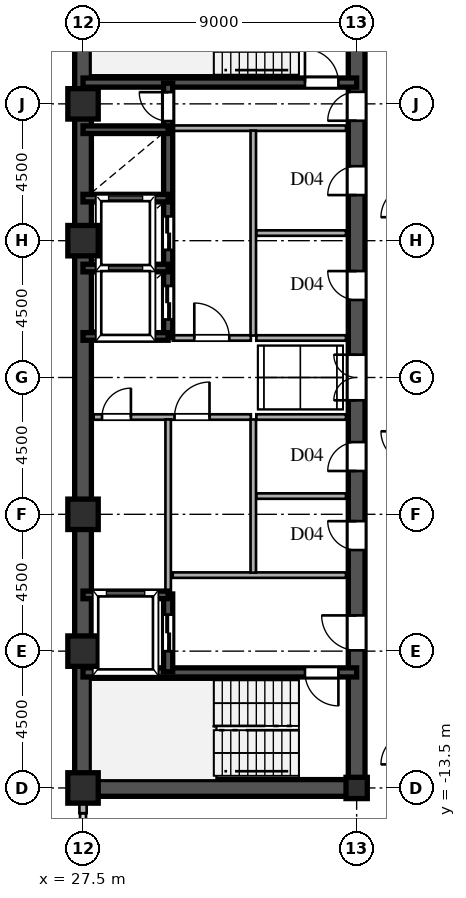
"""IFC4 building model, lengths in metres.
Left out: names, types, materials, properties, quantities, classifications, styles, units other than length and angle.
Written with IfcOpenShell. Run it as: python <this file> out.ifc"""

import sys

from ifc_helpers import new_model, si_unit, direction, frame, frame_2d, origin, origin_2d, place, context, subcontext, project, spatial, rectangle, hollow_rectangle, i_section, extrude, source, transform, mapped, element, fill, save


model = new_model("IFC4")
c1 = context("Model", 3, precision=1e-05, world=origin(), true_north=direction((0.0, 1.0)))
c2 = subcontext(c1, "Body", "Model", "MODEL_VIEW")
j1 = project(units=[si_unit("LENGTHUNIT", "METRE"), si_unit("PLANEANGLEUNIT", "RADIAN")], contexts=[c1])
p1 = place(None, origin())
s1 = spatial("IfcSite", under=j1, at=p1, CompositionType="ELEMENT")
p2 = place(p1, origin())
s2 = spatial("IfcBuilding", under=s1, at=p2, CompositionType="ELEMENT")
p3 = place(p2, frame((0.0, 0.0, 151.2)))
s3 = spatial("IfcBuildingStorey", under=s2, at=p3, CompositionType="ELEMENT", Elevation=151.2)
m1 = source(origin(), c2, "Body", "SweptSolid", [
    extrude(hollow_rectangle(XDim=1.0, YDim=1.0, WallThickness=0.042, at=origin_2d()), origin(), (0.0, 0.0, 1.0), 3.6),
])
for number, where, z_axis, x_axis in (
    (1, (27.5, -13.5, 0.0), (0.0, 0.0, 1.0), (1.0, 0.0, 0.0)),
    (2, (27.5, -9.0, 0.0), (0.0, 0.0, 1.0), (1.0, 0.0, 0.0)),
    (3, (27.5, -4.5, 0.0), (0.0, 0.0, 1.0), (1.0, 0.0, 0.0)),
    (4, (27.5, 4.5, 0.0), (0.0, 0.0, 1.0), (1.0, 0.0, 0.0)),
    (5, (27.5, 9.0, 0.0), (0.0, 0.0, 1.0), (1.0, 0.0, 0.0)),
):
    element("IfcColumn", number, at=place(p3, frame(where, z_axis=z_axis, x_axis=x_axis)), inside=s3, PredefinedType="COLUMN", context=c2, shape_type="MappedRepresentation", body=[
        mapped(m1, transform((0.0, 0.0, 0.0), scale=1.0)),
    ])
m2 = source(origin(), c2, "Body", "SweptSolid", [
    extrude(i_section(OverallWidth=0.7, OverallDepth=0.7, WebThickness=0.028, FlangeThickness=0.045, at=origin_2d()), origin(), (0.0, 0.0, 1.0), 3.6),
])
p4 = place(p3, frame((36.5, -13.5, 0.0), z_axis=(0.0, 0.0, 1.0), x_axis=(1.0, 0.0, 0.0)))
e6 = element("IfcColumn", 6, at=p4, inside=s3, PredefinedType="COLUMN", context=c2, shape_type="MappedRepresentation", body=[
    mapped(m2, transform((0.0, 0.0, 0.0), scale=1.0)),
])
p5 = place(p3, frame((27.5, -14.33, 0.0), z_axis=(0.0, 0.0, 1.0), x_axis=(0.0, 1.0, 0.0)))
e7 = element("IfcWall", 7, at=p5, inside=s3, PredefinedType="SOLIDWALL", context=c2, shape_type="SweptSolid", body=[
    extrude(rectangle(XDim=0.55, YDim=0.24, at=frame_2d((0.275, 0.0))), origin(), (0.0, 0.0, 1.0), 2.88),
])
for number, where, z_axis, x_axis in (
    (8, (27.5, -13.5, 0.0), (0.0, 0.0, 1.0), (0.0, 1.0, 0.0)),
    (9, (27.5, 1.3, 0.0), (0.0, 0.0, 1.0), (0.0, 1.0, 0.0)),
):
    element("IfcWall", number, at=place(p3, frame(where, z_axis=z_axis, x_axis=x_axis)), inside=s3, PredefinedType="SHEAR", context=c2, shape_type="SweptSolid", body=[
        extrude(rectangle(XDim=12.2, YDim=0.55, at=frame_2d((6.1, 0.0))), origin(), (0.0, 0.0, 1.0), 3.38),
    ])
p6 = place(p3, frame((27.5, -1.3, 0.0), z_axis=(0.0, 0.0, 1.0), x_axis=(0.0, 1.0, 0.0)))
e10 = element("IfcWall", 10, at=p6, inside=s3, PredefinedType="SHEAR", context=c2, shape_type="SweptSolid", body=[
    extrude(rectangle(XDim=2.6, YDim=0.55, at=frame_2d((1.3, 0.0))), origin(), (0.0, 0.0, 1.0), 3.38),
])
p7 = place(p3, frame((27.5, -13.5, 0.0), z_axis=(0.0, 0.0, 1.0), x_axis=(1.0, 0.0, 0.0)))
e11 = element("IfcWall", 11, at=p7, inside=s3, PredefinedType="SHEAR", context=c2, shape_type="SweptSolid", body=[
    extrude(rectangle(XDim=9.0, YDim=0.55, at=frame_2d((4.5, 0.0))), origin(), (0.0, 0.0, 1.0), 3.38),
])
p8 = place(p3, frame((36.5, -13.65, 0.0), z_axis=(0.0, 0.0, 1.0), x_axis=(0.0, 1.0, 0.0)))
e12 = element("IfcWall", 12, at=p8, inside=s3, PredefinedType="SHEAR", context=c2, shape_type="SweptSolid", body=[
    extrude(rectangle(XDim=7.15, YDim=0.55, at=frame_2d((3.575, 0.0))), origin(), (0.0, 0.0, 1.0), 3.38),
])
p9 = place(p8, frame((4.675, 0.0, 0.0)))
e13 = element("IfcOpeningElement", 13, at=p9, cuts=e12, PredefinedType="OPENING", context=c2, shape_type="SweptSolid", body=[
    extrude(rectangle(XDim=1.15, YDim=2.2, at=frame_2d((0.575, 1.1))), frame((0.0, 0.285, 0.0), z_axis=(0.0, -1.0, 0.0), x_axis=(1.0, 0.0, 0.0)), (0.0, 0.0, 1.0), 0.57),
])
p10 = place(p3, frame((36.5, -1.3, 0.0), z_axis=(0.0, 0.0, 1.0), x_axis=(0.0, 1.0, 0.0)))
e14 = element("IfcWall", 14, at=p10, inside=s3, PredefinedType="SHEAR", context=c2, shape_type="SweptSolid", body=[
    extrude(rectangle(XDim=2.6, YDim=0.55, at=frame_2d((1.3, 0.0))), origin(), (0.0, 0.0, 1.0), 3.38),
])
p11 = place(p10, frame((0.55, 0.0, 0.0)))
e15 = element("IfcOpeningElement", 15, at=p11, cuts=e14, PredefinedType="OPENING", context=c2, shape_type="SweptSolid", body=[
    extrude(rectangle(XDim=1.5, YDim=2.3, at=frame_2d((0.75, 1.15))), frame((0.0, 0.285, 0.0), z_axis=(0.0, -1.0, 0.0), x_axis=(1.0, 0.0, 0.0)), (0.0, 0.0, 1.0), 0.57),
])
p12 = place(p3, frame((36.5, 8.2, 0.0), z_axis=(0.0, 0.0, 1.0), x_axis=(0.0, 1.0, 0.0)))
e16 = element("IfcWall", 16, at=p12, inside=s3, PredefinedType="SHEAR", context=c2, shape_type="SweptSolid", body=[
    extrude(rectangle(XDim=5.45, YDim=0.55, at=frame_2d((2.725, 0.0))), origin(), (0.0, 0.0, 1.0), 3.38),
])
p13 = place(p12, frame((0.245, 0.0, 0.0)))
e17 = element("IfcOpeningElement", 17, at=p13, cuts=e16, PredefinedType="OPENING", context=c2, shape_type="SweptSolid", body=[
    extrude(rectangle(XDim=0.95, YDim=2.15, at=frame_2d((0.475, 1.075))), frame((0.0, 0.285, 0.0), z_axis=(0.0, -1.0, 0.0), x_axis=(1.0, 0.0, 0.0)), (0.0, 0.0, 1.0), 0.57),
])
p14 = place(p3, frame((36.5, -6.5, 0.0), z_axis=(0.0, 0.0, 1.0), x_axis=(0.0, 1.0, 0.0)))
e18 = element("IfcWall", 18, at=p14, inside=s3, PredefinedType="SHEAR", context=c2, shape_type="SweptSolid", body=[
    extrude(rectangle(XDim=2.6, YDim=0.55, at=frame_2d((1.3, 0.0))), origin(), (0.0, 0.0, 1.0), 3.38),
])
p15 = place(p14, frame((0.825, 0.0, 0.0)))
e19 = element("IfcOpeningElement", 19, at=p15, cuts=e18, PredefinedType="OPENING", context=c2, shape_type="SweptSolid", body=[
    extrude(rectangle(XDim=0.95, YDim=2.15, at=frame_2d((0.475, 1.075))), frame((0.0, 0.285, 0.0), z_axis=(0.0, -1.0, 0.0), x_axis=(1.0, 0.0, 0.0)), (0.0, 0.0, 1.0), 0.57),
])
p16 = place(p3, frame((36.5, -3.9, 0.0), z_axis=(0.0, 0.0, 1.0), x_axis=(0.0, 1.0, 0.0)))
e20 = element("IfcWall", 20, at=p16, inside=s3, PredefinedType="SHEAR", context=c2, shape_type="SweptSolid", body=[
    extrude(rectangle(XDim=2.6, YDim=0.55, at=frame_2d((1.3, 0.0))), origin(), (0.0, 0.0, 1.0), 3.38),
])
p17 = place(p16, frame((0.825, 0.0, 0.0)))
e21 = element("IfcOpeningElement", 21, at=p17, cuts=e20, PredefinedType="OPENING", context=c2, shape_type="SweptSolid", body=[
    extrude(rectangle(XDim=0.95, YDim=2.15, at=frame_2d((0.475, 1.075))), frame((0.0, 0.285, 0.0), z_axis=(0.0, -1.0, 0.0), x_axis=(1.0, 0.0, 0.0)), (0.0, 0.0, 1.0), 0.57),
])
p18 = place(p3, frame((36.5, 1.3, 0.0), z_axis=(0.0, 0.0, 1.0), x_axis=(0.0, 1.0, 0.0)))
e22 = element("IfcWall", 22, at=p18, inside=s3, PredefinedType="SHEAR", context=c2, shape_type="SweptSolid", body=[
    extrude(rectangle(XDim=3.45, YDim=0.55, at=frame_2d((1.725, 0.0))), origin(), (0.0, 0.0, 1.0), 3.38),
])
p19 = place(p18, frame((1.25, 0.0, 0.0)))
e23 = element("IfcOpeningElement", 23, at=p19, cuts=e22, PredefinedType="OPENING", context=c2, shape_type="SweptSolid", body=[
    extrude(rectangle(XDim=0.95, YDim=2.15, at=frame_2d((0.475, 1.075))), frame((0.0, 0.285, 0.0), z_axis=(0.0, -1.0, 0.0), x_axis=(1.0, 0.0, 0.0)), (0.0, 0.0, 1.0), 0.57),
])
p20 = place(p3, frame((36.5, 4.75, 0.0), z_axis=(0.0, 0.0, 1.0), x_axis=(0.0, 1.0, 0.0)))
e24 = element("IfcWall", 24, at=p20, inside=s3, PredefinedType="SHEAR", context=c2, shape_type="SweptSolid", body=[
    extrude(rectangle(XDim=3.45, YDim=0.55, at=frame_2d((1.725, 0.0))), origin(), (0.0, 0.0, 1.0), 3.38),
])
p21 = place(p20, frame((1.25, 0.0, 0.0)))
e25 = element("IfcOpeningElement", 25, at=p21, cuts=e24, PredefinedType="OPENING", context=c2, shape_type="SweptSolid", body=[
    extrude(rectangle(XDim=0.95, YDim=2.15, at=frame_2d((0.475, 1.075))), frame((0.0, 0.285, 0.0), z_axis=(0.0, -1.0, 0.0), x_axis=(1.0, 0.0, 0.0)), (0.0, 0.0, 1.0), 0.57),
])
p22 = place(p3, frame((27.5, -9.7, 0.0), z_axis=(0.0, 0.0, 1.0), x_axis=(1.0, 0.0, 0.0)))
e26 = element("IfcWall", 26, at=p22, inside=s3, PredefinedType="SHEAR", context=c2, shape_type="SweptSolid", body=[
    extrude(rectangle(XDim=9.0, YDim=0.3, at=frame_2d((4.5, 0.0))), origin(), (0.0, 0.0, 1.0), 3.38),
])
p23 = place(p22, frame((7.3, 0.0, 0.0)))
e27 = element("IfcOpeningElement", 27, at=p23, cuts=e26, PredefinedType="OPENING", context=c2, shape_type="SweptSolid", body=[
    extrude(rectangle(XDim=1.1, YDim=2.2, at=frame_2d((0.55, 1.1))), frame((0.0, 0.16, 0.0), z_axis=(0.0, -1.0, 0.0), x_axis=(1.0, 0.0, 0.0)), (0.0, 0.0, 1.0), 0.32),
])
p24 = place(p3, frame((27.5, 9.7, 0.0), z_axis=(0.0, 0.0, 1.0), x_axis=(1.0, 0.0, 0.0)))
e28 = element("IfcWall", 28, at=p24, inside=s3, PredefinedType="SHEAR", context=c2, shape_type="SweptSolid", body=[
    extrude(rectangle(XDim=9.0, YDim=0.3, at=frame_2d((4.5, 0.0))), origin(), (0.0, 0.0, 1.0), 3.38),
])
p25 = place(p24, frame((7.3, 0.0, 0.0)))
e29 = element("IfcOpeningElement", 29, at=p25, cuts=e28, PredefinedType="OPENING", context=c2, shape_type="SweptSolid", body=[
    extrude(rectangle(XDim=1.1, YDim=2.2, at=frame_2d((0.55, 1.1))), frame((0.0, 0.16, 0.0), z_axis=(0.0, -1.0, 0.0), x_axis=(1.0, 0.0, 0.0)), (0.0, 0.0, 1.0), 0.32),
])
for number, where, z_axis, x_axis in (
    (30, (27.5, -7.15, 0.0), (0.0, 0.0, 1.0), (1.0, 0.0, 0.0)),
    (31, (27.5, 1.35, 0.0), (0.0, 0.0, 1.0), (1.0, 0.0, 0.0)),
    (32, (27.5, 3.6, 0.0), (0.0, 0.0, 1.0), (1.0, 0.0, 0.0)),
    (33, (27.5, 5.9, 0.0), (0.0, 0.0, 1.0), (1.0, 0.0, 0.0)),
    (34, (27.5, 8.15, 0.0), (0.0, 0.0, 1.0), (1.0, 0.0, 0.0)),
):
    element("IfcWall", number, at=place(p3, frame(where, z_axis=z_axis, x_axis=x_axis)), inside=s3, PredefinedType="SHEAR", context=c2, shape_type="SweptSolid", body=[
        extrude(rectangle(XDim=2.8, YDim=0.25, at=frame_2d((1.4, 0.0))), origin(), (0.0, 0.0, 1.0), 3.38),
    ])
p26 = place(p3, frame((30.3, -9.68, 0.0), z_axis=(0.0, 0.0, 1.0), x_axis=(0.0, 1.0, 0.0)))
e35 = element("IfcWall", 35, at=p26, inside=s3, PredefinedType="SHEAR", context=c2, shape_type="SweptSolid", body=[
    extrude(rectangle(XDim=2.56, YDim=0.3, at=frame_2d((1.28, 0.0))), origin(), (0.0, 0.0, 1.0), 3.38),
])
p27 = place(p26, frame((0.68, 0.0, 0.0)))
e36 = element("IfcOpeningElement", 36, at=p27, cuts=e35, PredefinedType="OPENING", context=c2, shape_type="SweptSolid", body=[
    extrude(rectangle(XDim=1.2, YDim=2.25, at=frame_2d((0.6, 1.125))), frame((0.0, 0.16, 0.0), z_axis=(0.0, -1.0, 0.0), x_axis=(1.0, 0.0, 0.0)), (0.0, 0.0, 1.0), 0.32),
])
p28 = place(p3, frame((30.3, 1.32, 0.0), z_axis=(0.0, 0.0, 1.0), x_axis=(0.0, 1.0, 0.0)))
e37 = element("IfcWall", 37, at=p28, inside=s3, PredefinedType="SHEAR", context=c2, shape_type="SweptSolid", body=[
    extrude(rectangle(XDim=2.28, YDim=0.3, at=frame_2d((1.14, 0.0))), origin(), (0.0, 0.0, 1.0), 3.38),
])
p29 = place(p28, frame((0.59, 0.0, 0.0)))
e38 = element("IfcOpeningElement", 38, at=p29, cuts=e37, PredefinedType="OPENING", context=c2, shape_type="SweptSolid", body=[
    extrude(rectangle(XDim=1.1, YDim=2.2, at=frame_2d((0.55, 1.1))), frame((0.0, 0.16, 0.0), z_axis=(0.0, -1.0, 0.0), x_axis=(1.0, 0.0, 0.0)), (0.0, 0.0, 1.0), 0.32),
])
p30 = place(p3, frame((30.3, 3.6, 0.0), z_axis=(0.0, 0.0, 1.0), x_axis=(0.0, 1.0, 0.0)))
e39 = element("IfcWall", 39, at=p30, inside=s3, PredefinedType="SHEAR", context=c2, shape_type="SweptSolid", body=[
    extrude(rectangle(XDim=2.3, YDim=0.3, at=frame_2d((1.15, 0.0))), origin(), (0.0, 0.0, 1.0), 3.38),
])
p31 = place(p30, frame((0.6, 0.0, 0.0)))
e40 = element("IfcOpeningElement", 40, at=p31, cuts=e39, PredefinedType="OPENING", context=c2, shape_type="SweptSolid", body=[
    extrude(rectangle(XDim=1.1, YDim=2.2, at=frame_2d((0.55, 1.1))), frame((0.0, 0.16, 0.0), z_axis=(0.0, -1.0, 0.0), x_axis=(1.0, 0.0, 0.0)), (0.0, 0.0, 1.0), 0.32),
])
p32 = place(p3, frame((30.3, 5.9, 0.0), z_axis=(0.0, 0.0, 1.0), x_axis=(0.0, 1.0, 0.0)))
e41 = element("IfcWall", 41, at=p32, inside=s3, PredefinedType="SHEAR", context=c2, shape_type="SweptSolid", body=[
    extrude(rectangle(XDim=2.25, YDim=0.3, at=frame_2d((1.125, 0.0))), origin(), (0.0, 0.0, 1.0), 3.38),
])
p33 = place(p3, frame((30.3, 8.15, 0.0), z_axis=(0.0, 0.0, 1.0), x_axis=(0.0, 1.0, 0.0)))
e42 = element("IfcWall", 42, at=p33, inside=s3, PredefinedType="SHEAR", context=c2, shape_type="SweptSolid", body=[
    extrude(rectangle(XDim=1.53, YDim=0.3, at=frame_2d((0.765, 0.0))), origin(), (0.0, 0.0, 1.0), 3.38),
])
p34 = place(p33, frame((0.285, 0.0, 0.0)))
e43 = element("IfcOpeningElement", 43, at=p34, cuts=e42, PredefinedType="OPENING", context=c2, shape_type="SweptSolid", body=[
    extrude(rectangle(XDim=0.95, YDim=2.15, at=frame_2d((0.475, 1.075))), frame((0.0, 0.16, 0.0), z_axis=(0.0, -1.0, 0.0), x_axis=(1.0, 0.0, 0.0)), (0.0, 0.0, 1.0), 0.32),
])
for number, where, z_axis, x_axis in (
    (44, (30.45, -6.5, 0.0), (0.0, 0.0, 1.0), (1.0, 0.0, 0.0)),
    (45, (30.45, 8.2, 0.0), (0.0, 0.0, 1.0), (1.0, 0.0, 0.0)),
):
    element("IfcWall", number, at=place(p3, frame(where, z_axis=z_axis, x_axis=x_axis)), inside=s3, PredefinedType="PARTITIONING", context=c2, shape_type="SweptSolid", body=[
        extrude(rectangle(XDim=5.7, YDim=0.18, at=frame_2d((2.85, 0.0))), origin(), (0.0, 0.0, 1.0), 3.38),
    ])
p35 = place(p3, frame((33.1, -6.42, 0.0), z_axis=(0.0, 0.0, 1.0), x_axis=(0.0, 1.0, 0.0)))
e46 = element("IfcWall", 46, at=p35, inside=s3, PredefinedType="PARTITIONING", context=c2, shape_type="SweptSolid", body=[
    extrude(rectangle(XDim=5.04, YDim=0.18, at=frame_2d((2.52, 0.0))), origin(), (0.0, 0.0, 1.0), 3.38),
])
p36 = place(p3, frame((33.1, 1.38, 0.0), z_axis=(0.0, 0.0, 1.0), x_axis=(0.0, 1.0, 0.0)))
e47 = element("IfcWall", 47, at=p36, inside=s3, PredefinedType="PARTITIONING", context=c2, shape_type="SweptSolid", body=[
    extrude(rectangle(XDim=6.74, YDim=0.18, at=frame_2d((3.37, 0.0))), origin(), (0.0, 0.0, 1.0), 3.38),
])
p37 = place(p3, frame((27.85, -1.3, 0.0), z_axis=(0.0, 0.0, 1.0), x_axis=(1.0, 0.0, 0.0)))
e48 = element("IfcWall", 48, at=p37, inside=s3, PredefinedType="PARTITIONING", context=c2, shape_type="SweptSolid", body=[
    extrude(rectangle(XDim=2.45, YDim=0.18, at=frame_2d((1.225, 0.0))), origin(), (0.0, 0.0, 1.0), 3.38),
])
p38 = place(p37, frame((0.275, 0.0, 0.0)))
e49 = element("IfcOpeningElement", 49, at=p38, cuts=e48, PredefinedType="OPENING", context=c2, shape_type="SweptSolid", body=[
    extrude(rectangle(XDim=0.95, YDim=2.15, at=frame_2d((0.475, 1.075))), frame((0.0, 0.1, 0.0), z_axis=(0.0, -1.0, 0.0), x_axis=(1.0, 0.0, 0.0)), (0.0, 0.0, 1.0), 0.2),
])
p39 = place(p3, frame((30.3, -1.3, 0.0), z_axis=(0.0, 0.0, 1.0), x_axis=(1.0, 0.0, 0.0)))
e50 = element("IfcWall", 50, at=p39, inside=s3, PredefinedType="PARTITIONING", context=c2, shape_type="SweptSolid", body=[
    extrude(rectangle(XDim=2.72, YDim=0.18, at=frame_2d((1.36, 0.0))), origin(), (0.0, 0.0, 1.0), 3.38),
])
p40 = place(p39, frame((0.21, 0.0, 0.0)))
e51 = element("IfcOpeningElement", 51, at=p40, cuts=e50, PredefinedType="OPENING", context=c2, shape_type="SweptSolid", body=[
    extrude(rectangle(XDim=1.15, YDim=2.2, at=frame_2d((0.575, 1.1))), frame((0.0, 0.1, 0.0), z_axis=(0.0, -1.0, 0.0), x_axis=(1.0, 0.0, 0.0)), (0.0, 0.0, 1.0), 0.2),
])
p41 = place(p3, frame((30.3, -7.12, 0.0), z_axis=(0.0, 0.0, 1.0), x_axis=(0.0, 1.0, 0.0)))
e52 = element("IfcWall", 52, at=p41, inside=s3, PredefinedType="PARTITIONING", context=c2, shape_type="SweptSolid", body=[
    extrude(rectangle(XDim=5.74, YDim=0.18, at=frame_2d((2.87, 0.0))), origin(), (0.0, 0.0, 1.0), 3.38),
])
p42 = place(p3, frame((30.45, 1.3, 0.0), z_axis=(0.0, 0.0, 1.0), x_axis=(1.0, 0.0, 0.0)))
e53 = element("IfcWall", 53, at=p42, inside=s3, PredefinedType="PARTITIONING", context=c2, shape_type="SweptSolid", body=[
    extrude(rectangle(XDim=2.57, YDim=0.18, at=frame_2d((1.285, 0.0))), origin(), (0.0, 0.0, 1.0), 3.38),
])
p43 = place(p42, frame((0.71, 0.0, 0.0)))
e54 = element("IfcOpeningElement", 54, at=p43, cuts=e53, PredefinedType="OPENING", context=c2, shape_type="SweptSolid", body=[
    extrude(rectangle(XDim=1.15, YDim=2.2, at=frame_2d((0.575, 1.1))), frame((0.0, 0.1, 0.0), z_axis=(0.0, -1.0, 0.0), x_axis=(1.0, 0.0, 0.0)), (0.0, 0.0, 1.0), 0.2),
])
for number, where, z_axis, x_axis in (
    (55, (33.2, -1.3, 0.0), (0.0, 0.0, 1.0), (1.0, 0.0, 0.0)),
    (56, (33.2, 1.3, 0.0), (0.0, 0.0, 1.0), (1.0, 0.0, 0.0)),
    (57, (33.2, -3.9, 0.0), (0.0, 0.0, 1.0), (1.0, 0.0, 0.0)),
    (58, (33.2, 4.75, 0.0), (0.0, 0.0, 1.0), (1.0, 0.0, 0.0)),
):
    element("IfcWall", number, at=place(p3, frame(where, z_axis=z_axis, x_axis=x_axis)), inside=s3, PredefinedType="PARTITIONING", context=c2, shape_type="SweptSolid", body=[
        extrude(rectangle(XDim=2.95, YDim=0.18, at=frame_2d((1.475, 0.0))), origin(), (0.0, 0.0, 1.0), 3.38),
    ])
m3 = source(origin(), c2, "Body", "SweptSolid", [
    extrude(rectangle(XDim=1.15, YDim=2.2, at=frame_2d((0.575, 1.1))), frame((0.0, 0.025, 0.0), z_axis=(0.0, -1.0, 0.0), x_axis=(1.0, 0.0, 0.0)), (0.0, 0.0, 1.0), 0.05),
])
p44 = place(p9, origin())
e59 = element("IfcDoor", 59, at=p44, inside=s3, OperationType="SINGLE_SWING_RIGHT", PredefinedType="DOOR", context=c2, shape_type="MappedRepresentation", body=[
    mapped(m3, transform((0.0, 0.0, 0.0), scale=1.0)),
])
fill(e13, e59)
m4 = source(origin(), c2, "Body", "SweptSolid", [
    extrude(rectangle(XDim=1.5, YDim=2.3, at=frame_2d((0.75, 1.15))), frame((0.0, 0.025, 0.0), z_axis=(0.0, -1.0, 0.0), x_axis=(1.0, 0.0, 0.0)), (0.0, 0.0, 1.0), 0.05),
])
p45 = place(p11, origin())
e60 = element("IfcDoor", 60, at=p45, inside=s3, OperationType="DOUBLE_SWING_LEFT", PredefinedType="DOOR", context=c2, shape_type="MappedRepresentation", body=[
    mapped(m4, transform((0.0, 0.0, 0.0), scale=1.0)),
])
fill(e15, e60)
m5 = source(origin(), c2, "Body", "SweptSolid", [
    extrude(rectangle(XDim=0.95, YDim=2.15, at=frame_2d((0.475, 1.075))), frame((0.0, 0.025, 0.0), z_axis=(0.0, -1.0, 0.0), x_axis=(1.0, 0.0, 0.0)), (0.0, 0.0, 1.0), 0.05),
])
p46 = place(p13, origin())
e61 = element("IfcDoor", 61, at=p46, inside=s3, OperationType="SINGLE_SWING_LEFT", PredefinedType="DOOR", context=c2, shape_type="MappedRepresentation", body=[
    mapped(m5, transform((0.0, 0.0, 0.0), scale=1.0)),
])
fill(e17, e61)
p47 = place(p15, origin())
e62 = element("IfcDoor", 62, at=p47, inside=s3, OperationType="SINGLE_SWING_RIGHT", PredefinedType="DOOR", context=c2, shape_type="MappedRepresentation", body=[
    mapped(m5, transform((0.0, 0.0, 0.0), scale=1.0)),
])
fill(e19, e62)
p48 = place(p17, origin())
e63 = element("IfcDoor", 63, at=p48, inside=s3, OperationType="SINGLE_SWING_LEFT", PredefinedType="DOOR", context=c2, shape_type="MappedRepresentation", body=[
    mapped(m5, transform((0.0, 0.0, 0.0), scale=1.0)),
])
fill(e21, e63)
p49 = place(p19, origin())
e64 = element("IfcDoor", 64, at=p49, inside=s3, OperationType="SINGLE_SWING_RIGHT", PredefinedType="DOOR", context=c2, shape_type="MappedRepresentation", body=[
    mapped(m5, transform((0.0, 0.0, 0.0), scale=1.0)),
])
fill(e23, e64)
p50 = place(p21, origin())
e65 = element("IfcDoor", 65, at=p50, inside=s3, OperationType="SINGLE_SWING_LEFT", PredefinedType="DOOR", context=c2, shape_type="MappedRepresentation", body=[
    mapped(m5, transform((0.0, 0.0, 0.0), scale=1.0)),
])
fill(e25, e65)
m6 = source(origin(), c2, "Body", "SweptSolid", [
    extrude(rectangle(XDim=1.1, YDim=2.2, at=frame_2d((0.55, 1.1))), frame((0.0, 0.025, 0.0), z_axis=(0.0, -1.0, 0.0), x_axis=(1.0, 0.0, 0.0)), (0.0, 0.0, 1.0), 0.05),
])
p51 = place(p23, frame((1.1, 0.0, 0.0), z_axis=(0.0, 0.0, 1.0), x_axis=(-1.0, 0.0, 0.0)))
e66 = element("IfcDoor", 66, at=p51, inside=s3, OperationType="SINGLE_SWING_RIGHT", PredefinedType="DOOR", context=c2, shape_type="MappedRepresentation", body=[
    mapped(m6, transform((0.0, 0.0, 0.0), scale=1.0)),
])
fill(e27, e66)
p52 = place(p25, origin())
e67 = element("IfcDoor", 67, at=p52, inside=s3, OperationType="SINGLE_SWING_LEFT", PredefinedType="DOOR", context=c2, shape_type="MappedRepresentation", body=[
    mapped(m6, transform((0.0, 0.0, 0.0), scale=1.0)),
])
fill(e29, e67)
m7 = source(origin(), c2, "Body", "SweptSolid", [
    extrude(rectangle(XDim=1.2, YDim=2.25, at=frame_2d((0.6, 1.125))), frame((0.0, 0.025, 0.0), z_axis=(0.0, -1.0, 0.0), x_axis=(1.0, 0.0, 0.0)), (0.0, 0.0, 1.0), 0.05),
])
p53 = place(p27, origin())
e68 = element("IfcDoor", 68, at=p53, inside=s3, OperationType="DOUBLE_DOOR_SLIDING", PredefinedType="DOOR", context=c2, shape_type="MappedRepresentation", body=[
    mapped(m7, transform((0.0, 0.0, 0.0), scale=1.0)),
])
fill(e36, e68)
m8 = source(origin(), c2, "Body", "SweptSolid", [
    extrude(rectangle(XDim=1.1, YDim=2.2, at=frame_2d((0.55, 1.1))), frame((0.0, 0.025, 0.0), z_axis=(0.0, -1.0, 0.0), x_axis=(1.0, 0.0, 0.0)), (0.0, 0.0, 1.0), 0.05),
])
p54 = place(p29, origin())
e69 = element("IfcDoor", 69, at=p54, inside=s3, OperationType="DOUBLE_DOOR_SLIDING", PredefinedType="DOOR", context=c2, shape_type="MappedRepresentation", body=[
    mapped(m8, transform((0.0, 0.0, 0.0), scale=1.0)),
])
fill(e38, e69)
p55 = place(p31, origin())
e70 = element("IfcDoor", 70, at=p55, inside=s3, OperationType="DOUBLE_DOOR_SLIDING", PredefinedType="DOOR", context=c2, shape_type="MappedRepresentation", body=[
    mapped(m8, transform((0.0, 0.0, 0.0), scale=1.0)),
])
fill(e40, e70)
p56 = place(p34, origin())
e71 = element("IfcDoor", 71, at=p56, inside=s3, OperationType="SINGLE_SWING_RIGHT", PredefinedType="DOOR", context=c2, shape_type="MappedRepresentation", body=[
    mapped(m5, transform((0.0, 0.0, 0.0), scale=1.0)),
])
fill(e43, e71)
p57 = place(p38, origin())
e72 = element("IfcDoor", 72, at=p57, inside=s3, OperationType="SINGLE_SWING_RIGHT", PredefinedType="DOOR", context=c2, shape_type="MappedRepresentation", body=[
    mapped(m5, transform((0.0, 0.0, 0.0), scale=1.0)),
])
fill(e49, e72)
p58 = place(p40, origin())
e73 = element("IfcDoor", 73, at=p58, inside=s3, OperationType="SINGLE_SWING_RIGHT", PredefinedType="DOOR", context=c2, shape_type="MappedRepresentation", body=[
    mapped(m3, transform((0.0, 0.0, 0.0), scale=1.0)),
])
fill(e51, e73)
p59 = place(p43, origin())
e74 = element("IfcDoor", 74, at=p59, inside=s3, OperationType="SINGLE_SWING_LEFT", PredefinedType="DOOR", context=c2, shape_type="MappedRepresentation", body=[
    mapped(m3, transform((0.0, 0.0, 0.0), scale=1.0)),
])
fill(e54, e74)
save(model, sys.argv[1])
